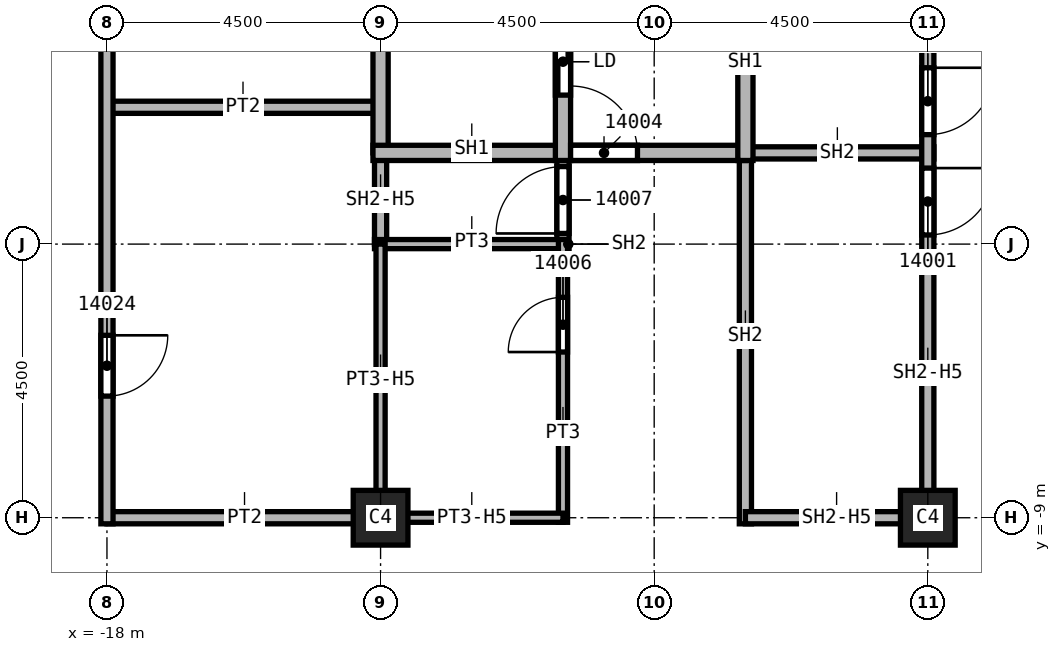
"""IFC4 building model, lengths in metres.
Left out: names, types, materials, properties, quantities, classifications, styles, units other than length and angle.
Written with IfcOpenShell. Run it as: python <this file> out.ifc"""

import sys

from ifc_helpers import new_model, si_unit, direction, frame, frame_2d, origin, origin_2d, place, context, subcontext, project, spatial, rectangle, extrude, element, fill, save


model = new_model("IFC4")
c1 = context("Model", 3, precision=1e-05, world=origin(), true_north=direction((0.0, 1.0)))
c2 = subcontext(c1, "Body", "Model", "MODEL_VIEW")
j1 = project(units=[si_unit("LENGTHUNIT", "METRE"), si_unit("PLANEANGLEUNIT", "RADIAN")], contexts=[c1])
p1 = place(None, origin())
s1 = spatial("IfcSite", under=j1, at=p1, CompositionType="ELEMENT")
p2 = place(p1, origin())
s2 = spatial("IfcBuilding", under=s1, at=p2, CompositionType="ELEMENT")
p3 = place(p2, frame((0.0, 0.0, 220.0)))
s3 = spatial("IfcBuildingStorey", under=s2, at=p3, CompositionType="ELEMENT", Elevation=220.0)
for number, where, z_axis, x_axis in (
    (1, (-4.5, -9.0, 0.0), (0.0, 0.0, 1.0), (1.0, 0.0, 0.0)),
    (2, (-13.5, -9.0, 0.0), (0.0, 0.0, 1.0), (1.0, 0.0, 0.0)),
):
    element("IfcColumn", number, at=place(p3, frame(where, z_axis=z_axis, x_axis=x_axis)), inside=s3, PredefinedType="COLUMN", context=c2, shape_type="SweptSolid", body=[
        extrude(rectangle(XDim=0.9, YDim=0.9, at=origin_2d()), origin(), (0.0, 0.0, 1.0), 3.72),
    ])
for number, where, z_axis, x_axis in (
    (3, (-18.0, -9.0, 0.0), (0.0, 0.0, 1.0), (1.0, 0.0, 0.0)),
    (4, (-18.0, -2.25, 0.0), (0.0, 0.0, 1.0), (1.0, 0.0, 0.0)),
):
    element("IfcWall", number, at=place(p3, frame(where, z_axis=z_axis, x_axis=x_axis)), inside=s3, PredefinedType="PARTITIONING", context=c2, shape_type="SweptSolid", body=[
        extrude(rectangle(XDim=4.5, YDim=0.2, at=frame_2d((2.25, 0.0))), origin(), (0.0, 0.0, 1.0), 3.72),
    ])
p4 = place(p3, frame((-18.0, 9.1, 0.0), z_axis=(0.0, 0.0, 1.0), x_axis=(0.0, -1.0, 0.0)))
e5 = element("IfcWall", 5, at=p4, inside=s3, PredefinedType="PARTITIONING", context=c2, shape_type="SweptSolid", body=[
    extrude(rectangle(XDim=18.2, YDim=0.2, at=frame_2d((9.1, 0.0))), origin(), (0.0, 0.0, 1.0), 3.72),
])
p5 = place(p4, frame((15.1, 0.0, 0.0)))
e6 = element("IfcOpeningElement", 6, at=p5, cuts=e5, PredefinedType="OPENING", context=c2, shape_type="SweptSolid", body=[
    extrude(rectangle(XDim=1.0, YDim=2.1, at=frame_2d((0.5, 1.05))), frame((0.0, 0.1, 0.0), z_axis=(0.0, -1.0, 0.0), x_axis=(1.0, 0.0, 0.0)), (0.0, 0.0, 1.0), 0.2),
])
p6 = place(p4, frame((5.2, 0.0, 0.0)))
e7 = element("IfcOpeningElement", 7, at=p6, cuts=e5, PredefinedType="OPENING", context=c2, shape_type="SweptSolid", body=[
    extrude(rectangle(XDim=1.0, YDim=2.1, at=frame_2d((0.5, 1.05))), frame((0.0, 0.1, 0.0), z_axis=(0.0, -1.0, 0.0), x_axis=(1.0, 0.0, 0.0)), (0.0, 0.0, 1.0), 0.2),
])
p7 = place(p3, frame((-13.5, -4.5, 0.0), z_axis=(0.0, 0.0, 1.0), x_axis=(0.0, 1.0, 0.0)))
e8 = element("IfcWall", 8, at=p7, inside=s3, PredefinedType="SOLIDWALL", context=c2, shape_type="SweptSolid", body=[
    extrude(rectangle(XDim=1.5, YDim=0.2, at=frame_2d((0.75, 0.0))), origin(), (0.0, 0.0, 1.0), 2.958),
])
p8 = place(p3, frame((-10.5, -4.575, 0.0), z_axis=(0.0, 0.0, 1.0), x_axis=(0.0, 1.0, 0.0)))
e9 = element("IfcWall", 9, at=p8, inside=s3, PredefinedType="SOLIDWALL", context=c2, shape_type="SweptSolid", body=[
    extrude(rectangle(XDim=1.7, YDim=0.2, at=frame_2d((0.85, 0.0))), origin(), (0.0, 0.0, 1.0), 3.72),
])
p9 = place(p8, frame((0.25, 0.0, 0.0)))
e10 = element("IfcOpeningElement", 10, at=p9, cuts=e9, PredefinedType="OPENING", context=c2, shape_type="SweptSolid", body=[
    extrude(rectangle(XDim=1.1, YDim=2.1, at=frame_2d((0.55, 1.05))), frame((0.0, 0.1, 0.0), z_axis=(0.0, -1.0, 0.0), x_axis=(1.0, 0.0, 0.0)), (0.0, 0.0, 1.0), 0.2),
])
p10 = place(p3, frame((-7.625, -3.0, 0.0), z_axis=(0.0, 0.0, 1.0), x_axis=(1.0, 0.0, 0.0)))
e11 = element("IfcWall", 11, at=p10, inside=s3, PredefinedType="SOLIDWALL", context=c2, shape_type="SweptSolid", body=[
    extrude(rectangle(XDim=3.225, YDim=0.2, at=frame_2d((1.613, 0.0))), origin(), (0.0, 0.0, 1.0), 3.72),
])
p11 = place(p3, frame((-7.5, -9.1, 0.0), z_axis=(0.0, 0.0, 1.0), x_axis=(0.0, 1.0, 0.0)))
e12 = element("IfcWall", 12, at=p11, inside=s3, PredefinedType="SOLIDWALL", context=c2, shape_type="SweptSolid", body=[
    extrude(rectangle(XDim=6.225, YDim=0.2, at=frame_2d((3.113, 0.0))), origin(), (0.0, 0.0, 1.0), 3.72),
])
p12 = place(p3, frame((-4.5, -9.0, 0.0), z_axis=(0.0, 0.0, 1.0), x_axis=(-1.0, 0.0, 0.0)))
e13 = element("IfcWall", 13, at=p12, inside=s3, PredefinedType="SOLIDWALL", context=c2, shape_type="SweptSolid", body=[
    extrude(rectangle(XDim=3.0, YDim=0.2, at=frame_2d((1.5, 0.0))), origin(), (0.0, 0.0, 1.0), 2.958),
])
p13 = place(p3, frame((-4.5, 0.0, 0.0), z_axis=(0.0, 0.0, 1.0), x_axis=(0.0, -1.0, 0.0)))
e14 = element("IfcWall", 14, at=p13, inside=s3, PredefinedType="SOLIDWALL", context=c2, shape_type="SweptSolid", body=[
    extrude(rectangle(XDim=9.1, YDim=0.2, at=frame_2d((4.55, 0.0))), origin(), (0.0, 0.0, 1.0), 2.958),
])
p14 = place(p13, frame((3.25, 0.0, 0.0)))
e15 = element("IfcOpeningElement", 15, at=p14, cuts=e14, PredefinedType="OPENING", context=c2, shape_type="SweptSolid", body=[
    extrude(rectangle(XDim=1.1, YDim=2.1, at=frame_2d((0.55, 1.05))), frame((0.0, 0.1, 0.0), z_axis=(0.0, -1.0, 0.0), x_axis=(1.0, 0.0, 0.0)), (0.0, 0.0, 1.0), 0.2),
])
p15 = place(p13, frame((1.6, 0.0, 0.0)))
e16 = element("IfcOpeningElement", 16, at=p15, cuts=e14, PredefinedType="OPENING", context=c2, shape_type="SweptSolid", body=[
    extrude(rectangle(XDim=1.1, YDim=2.1, at=frame_2d((0.55, 1.05))), frame((0.0, 0.1, 0.0), z_axis=(0.0, -1.0, 0.0), x_axis=(1.0, 0.0, 0.0)), (0.0, 0.0, 1.0), 0.2),
])
p16 = place(p3, frame((-13.5, -3.0, 0.0), z_axis=(0.0, 0.0, 1.0), x_axis=(0.0, 1.0, 0.0)))
e17 = element("IfcWall", 17, at=p16, inside=s3, PredefinedType="SOLIDWALL", context=c2, shape_type="SweptSolid", body=[
    extrude(rectangle(XDim=6.0, YDim=0.25, at=frame_2d((3.0, 0.0))), origin(), (0.0, 0.0, 1.0), 2.958),
])
p17 = place(p3, frame((-13.625, -3.0, 0.0), z_axis=(0.0, 0.0, 1.0), x_axis=(1.0, 0.0, 0.0)))
e18 = element("IfcWall", 18, at=p17, inside=s3, PredefinedType="SOLIDWALL", context=c2, shape_type="SweptSolid", body=[
    extrude(rectangle(XDim=6.125, YDim=0.25, at=frame_2d((3.062, 0.0))), origin(), (0.0, 0.0, 1.0), 3.72),
])
p18 = place(p17, frame((3.25, 0.0, 0.0)))
e19 = element("IfcOpeningElement", 19, at=p18, cuts=e18, PredefinedType="OPENING", context=c2, shape_type="SweptSolid", body=[
    extrude(rectangle(XDim=1.1, YDim=2.1, at=frame_2d((0.55, 1.05))), frame((0.0, 0.125, 0.0), z_axis=(0.0, -1.0, 0.0), x_axis=(1.0, 0.0, 0.0)), (0.0, 0.0, 1.0), 0.25),
])
p19 = place(p3, frame((-10.5, -3.125, 0.0), z_axis=(0.0, 0.0, 1.0), x_axis=(0.0, 1.0, 0.0)))
e20 = element("IfcWall", 20, at=p19, inside=s3, PredefinedType="SOLIDWALL", context=c2, shape_type="SweptSolid", body=[
    extrude(rectangle(XDim=6.25, YDim=0.25, at=frame_2d((3.125, 0.0))), origin(), (0.0, 0.0, 1.0), 3.72),
])
p20 = place(p19, frame((1.075, 0.0, 0.0)))
e21 = element("IfcOpeningElement", 21, at=p20, cuts=e20, PredefinedType="OPENING", context=c2, shape_type="SweptSolid", body=[
    extrude(rectangle(XDim=1.1, YDim=2.1, at=frame_2d((0.55, 1.05))), frame((0.0, 0.125, 0.0), z_axis=(0.0, -1.0, 0.0), x_axis=(1.0, 0.0, 0.0)), (0.0, 0.0, 1.0), 0.25),
])
p21 = place(p19, frame((4.075, 0.0, 0.0)))
e22 = element("IfcOpeningElement", 22, at=p21, cuts=e20, PredefinedType="OPENING", context=c2, shape_type="SweptSolid", body=[
    extrude(rectangle(XDim=1.1, YDim=2.1, at=frame_2d((0.55, 1.05))), frame((0.0, 0.125, 0.0), z_axis=(0.0, -1.0, 0.0), x_axis=(1.0, 0.0, 0.0)), (0.0, 0.0, 1.0), 0.25),
])
p22 = place(p3, frame((-7.5, -3.125, 0.0), z_axis=(0.0, 0.0, 1.0), x_axis=(0.0, 1.0, 0.0)))
e23 = element("IfcWall", 23, at=p22, inside=s3, PredefinedType="SOLIDWALL", context=c2, shape_type="SweptSolid", body=[
    extrude(rectangle(XDim=9.125, YDim=0.25, at=frame_2d((4.562, 0.0))), origin(), (0.0, 0.0, 1.0), 3.72),
])
p23 = place(p3, frame((-13.6, -4.5, 0.0), z_axis=(0.0, 0.0, 1.0), x_axis=(1.0, 0.0, 0.0)))
e24 = element("IfcWall", 24, at=p23, inside=s3, PredefinedType="PARTITIONING", context=c2, shape_type="SweptSolid", body=[
    extrude(rectangle(XDim=3.1, YDim=0.15, at=frame_2d((1.55, 0.0))), origin(), (0.0, 0.0, 1.0), 3.72),
])
p24 = place(p3, frame((-13.5, -9.1, 0.0), z_axis=(0.0, 0.0, 1.0), x_axis=(0.0, 1.0, 0.0)))
e25 = element("IfcWall", 25, at=p24, inside=s3, PredefinedType="PARTITIONING", context=c2, shape_type="SweptSolid", body=[
    extrude(rectangle(XDim=4.6, YDim=0.15, at=frame_2d((2.3, 0.0))), origin(), (0.0, 0.0, 1.0), 2.958),
])
p25 = place(p3, frame((-10.5, -9.075, 0.0), z_axis=(0.0, 0.0, 1.0), x_axis=(0.0, 1.0, 0.0)))
e26 = element("IfcWall", 26, at=p25, inside=s3, PredefinedType="PARTITIONING", context=c2, shape_type="SweptSolid", body=[
    extrude(rectangle(XDim=4.65, YDim=0.15, at=frame_2d((2.325, 0.0))), origin(), (0.0, 0.0, 1.0), 3.72),
])
p26 = place(p25, frame((2.8, 0.0, 0.0)))
e27 = element("IfcOpeningElement", 27, at=p26, cuts=e26, PredefinedType="OPENING", context=c2, shape_type="SweptSolid", body=[
    extrude(rectangle(XDim=0.9, YDim=2.1, at=frame_2d((0.45, 1.05))), frame((0.0, 0.075, 0.0), z_axis=(0.0, -1.0, 0.0), x_axis=(1.0, 0.0, 0.0)), (0.0, 0.0, 1.0), 0.15),
])
p27 = place(p3, frame((-10.5, -9.0, 0.0), z_axis=(0.0, 0.0, 1.0), x_axis=(-1.0, 0.0, 0.0)))
e28 = element("IfcWall", 28, at=p27, inside=s3, PredefinedType="PARTITIONING", context=c2, shape_type="SweptSolid", body=[
    extrude(rectangle(XDim=3.075, YDim=0.15, at=frame_2d((1.538, 0.0))), origin(), (0.0, 0.0, 1.0), 2.958),
])
p28 = place(p14, origin())
e29 = element("IfcDoor", 29, at=p28, inside=s3, OperationType="SINGLE_SWING_RIGHT", PredefinedType="DOOR", context=c2, shape_type="SweptSolid", body=[
    extrude(rectangle(XDim=1.1, YDim=2.1, at=frame_2d((0.55, 1.05))), frame((0.0, 0.025, 0.0), z_axis=(0.0, -1.0, 0.0), x_axis=(1.0, 0.0, 0.0)), (0.0, 0.0, 1.0), 0.05),
])
fill(e15, e29)
p29 = place(p15, origin())
e30 = element("IfcDoor", 30, at=p29, inside=s3, OperationType="SINGLE_SWING_LEFT", PredefinedType="DOOR", context=c2, shape_type="SweptSolid", body=[
    extrude(rectangle(XDim=1.1, YDim=2.1, at=frame_2d((0.55, 1.05))), frame((0.0, 0.025, 0.0), z_axis=(0.0, -1.0, 0.0), x_axis=(1.0, 0.0, 0.0)), (0.0, 0.0, 1.0), 0.05),
])
fill(e16, e30)
p30 = place(p18, origin())
e31 = element("IfcDoor", 31, at=p30, inside=s3, OperationType="SINGLE_SWING_LEFT", PredefinedType="DOOR", context=c2, shape_type="SweptSolid", body=[
    extrude(rectangle(XDim=1.1, YDim=2.1, at=frame_2d((0.55, 1.05))), frame((0.0, 0.025, 0.0), z_axis=(0.0, -1.0, 0.0), x_axis=(1.0, 0.0, 0.0)), (0.0, 0.0, 1.0), 0.05),
])
fill(e19, e31)
p31 = place(p26, origin())
e32 = element("IfcDoor", 32, at=p31, inside=s3, OperationType="SINGLE_SWING_LEFT", PredefinedType="DOOR", context=c2, shape_type="SweptSolid", body=[
    extrude(rectangle(XDim=0.9, YDim=2.1, at=frame_2d((0.45, 1.05))), frame((0.0, 0.025, 0.0), z_axis=(0.0, -1.0, 0.0), x_axis=(1.0, 0.0, 0.0)), (0.0, 0.0, 1.0), 0.05),
])
fill(e27, e32)
p32 = place(p9, origin())
e33 = element("IfcDoor", 33, at=p32, inside=s3, OperationType="SINGLE_SWING_RIGHT", PredefinedType="DOOR", context=c2, shape_type="SweptSolid", body=[
    extrude(rectangle(XDim=1.1, YDim=2.1, at=frame_2d((0.55, 1.05))), frame((0.0, 0.025, 0.0), z_axis=(0.0, -1.0, 0.0), x_axis=(1.0, 0.0, 0.0)), (0.0, 0.0, 1.0), 0.05),
])
fill(e10, e33)
p33 = place(p5, origin())
e34 = element("IfcDoor", 34, at=p33, inside=s3, OperationType="SINGLE_SWING_LEFT", PredefinedType="DOOR", context=c2, shape_type="SweptSolid", body=[
    extrude(rectangle(XDim=1.0, YDim=2.1, at=frame_2d((0.5, 1.05))), frame((0.0, 0.025, 0.0), z_axis=(0.0, -1.0, 0.0), x_axis=(1.0, 0.0, 0.0)), (0.0, 0.0, 1.0), 0.05),
])
fill(e6, e34)
p34 = place(p20, origin())
e35 = element("IfcDoor", 35, at=p34, inside=s3, OperationType="SLIDING_TO_LEFT", PredefinedType="DOOR", context=c2, shape_type="SweptSolid", body=[
    extrude(rectangle(XDim=1.1, YDim=2.1, at=frame_2d((0.55, 1.05))), frame((0.0, 0.025, 0.0), z_axis=(0.0, -1.0, 0.0), x_axis=(1.0, 0.0, 0.0)), (0.0, 0.0, 1.0), 0.05),
])
fill(e21, e35)
save(model, sys.argv[1])
